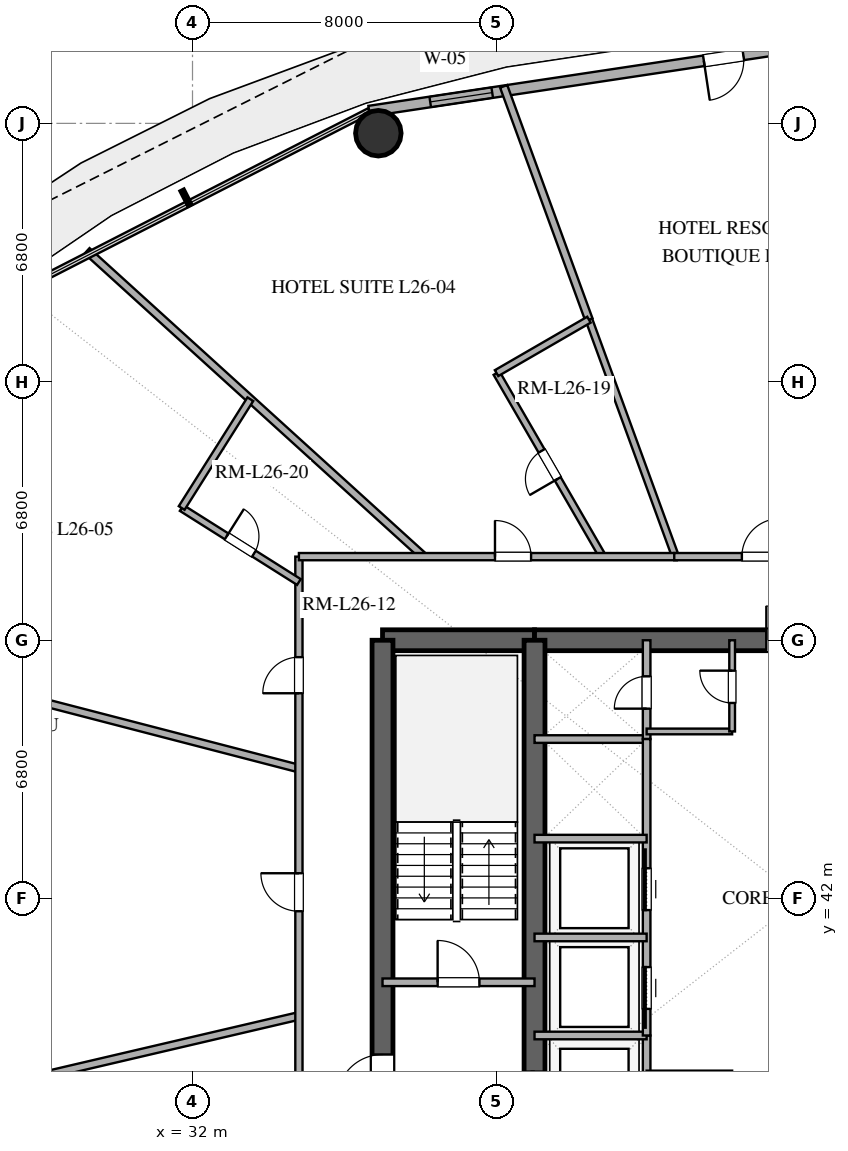
"""IFC4 building model, lengths in metres.
Left out: names, types, materials, properties, quantities, classifications, styles, units other than length and angle.
Written with IfcOpenShell. Run it as: python <this file> out.ifc"""

import sys

from ifc_helpers import new_model, si_unit, direction, frame, frame_2d, origin, origin_2d, place, context, subcontext, project, spatial, rectangle, hollow_circle, extrude, element, fill, save


model = new_model("IFC4")
c1 = context("Model", 3, precision=1e-05, world=origin(), true_north=direction((0.0, 1.0)))
c2 = subcontext(c1, "Body", "Model", "MODEL_VIEW")
j1 = project(units=[si_unit("LENGTHUNIT", "METRE"), si_unit("PLANEANGLEUNIT", "RADIAN")], contexts=[c1])
p1 = place(None, origin())
s1 = spatial("IfcSite", under=j1, at=p1, CompositionType="ELEMENT")
p2 = place(p1, origin())
s2 = spatial("IfcBuilding", under=s1, at=p2, CompositionType="ELEMENT")
p3 = place(p2, frame((0.0, 0.0, 105.6)))
s3 = spatial("IfcBuildingStorey", under=s2, at=p3, CompositionType="ELEMENT", Elevation=105.6)
p4 = place(p3, frame((37.0, 48.8, 0.0), z_axis=(0.0, 0.0, 1.0), x_axis=(1.0, 0.0, 0.0)))
e1 = element("IfcWall", 1, at=p4, inside=s3, PredefinedType="SHEAR", context=c2, shape_type="SweptSolid", body=[
    extrude(rectangle(XDim=4.0, YDim=0.55, at=frame_2d((2.0, 0.0))), origin(), (0.0, 0.0, 1.0), 3.38),
])
p5 = place(p3, frame((41.0, 48.8, 0.0), z_axis=(0.0, 0.0, 1.0), x_axis=(1.0, 0.0, 0.0)))
e2 = element("IfcWall", 2, at=p5, inside=s3, PredefinedType="SHEAR", context=c2, shape_type="SweptSolid", body=[
    extrude(rectangle(XDim=14.0, YDim=0.55, at=frame_2d((7.0, 0.0))), origin(), (0.0, 0.0, 1.0), 3.38),
])
p6 = place(p5, frame((6.1, 0.0, 0.0)))
e3 = element("IfcOpeningElement", 3, at=p6, cuts=e2, PredefinedType="OPENING", context=c2, shape_type="SweptSolid", body=[
    extrude(rectangle(XDim=1.8, YDim=2.25, at=frame_2d((0.9, 1.125))), frame((0.0, 0.285, 0.0), z_axis=(0.0, -1.0, 0.0), x_axis=(1.0, 0.0, 0.0)), (0.0, 0.0, 1.0), 0.57),
])
p7 = place(p3, frame((37.0, 35.2, 0.0), z_axis=(0.0, 0.0, 1.0), x_axis=(0.0, 1.0, 0.0)))
e4 = element("IfcWall", 4, at=p7, inside=s3, PredefinedType="SHEAR", context=c2, shape_type="SweptSolid", body=[
    extrude(rectangle(XDim=13.6, YDim=0.55, at=frame_2d((6.8, 0.0))), origin(), (0.0, 0.0, 1.0), 3.38),
])
p8 = place(p7, frame((1.5, 0.0, 0.0)))
e5 = element("IfcOpeningElement", 5, at=p8, cuts=e4, PredefinedType="OPENING", context=c2, shape_type="SweptSolid", body=[
    extrude(rectangle(XDim=1.2, YDim=2.15, at=frame_2d((0.6, 1.075))), frame((0.0, 0.285, 0.0), z_axis=(0.0, -1.0, 0.0), x_axis=(1.0, 0.0, 0.0)), (0.0, 0.0, 1.0), 0.57),
])
p9 = place(p3, frame((41.0, 35.2, 0.0), z_axis=(0.0, 0.0, 1.0), x_axis=(0.0, 1.0, 0.0)))
e6 = element("IfcWall", 6, at=p9, inside=s3, PredefinedType="SHEAR", context=c2, shape_type="SweptSolid", body=[
    extrude(rectangle(XDim=13.6, YDim=0.55, at=frame_2d((6.8, 0.0))), origin(), (0.0, 0.0, 1.0), 3.38),
])
p10 = place(p9, frame((1.15, 0.0, 0.0)))
e7 = element("IfcOpeningElement", 7, at=p10, cuts=e6, PredefinedType="OPENING", context=c2, shape_type="SweptSolid", body=[
    extrude(rectangle(XDim=1.1, YDim=2.2, at=frame_2d((0.55, 1.1))), frame((0.0, 0.285, 0.0), z_axis=(0.0, -1.0, 0.0), x_axis=(1.0, 0.0, 0.0)), (0.0, 0.0, 1.0), 0.57),
])
p11 = place(p3, frame((36.89, 62.141, 0.0), z_axis=(0.0, 0.0, 1.0), x_axis=(1.0, 0.0, 0.0)))
e8 = element("IfcColumn", 8, at=p11, inside=s3, PredefinedType="COLUMN", context=c2, shape_type="SweptSolid", body=[
    extrude(hollow_circle(Radius=0.6, WallThickness=0.032, at=origin_2d()), origin(), (0.0, 0.0, 1.0), 3.38),
])
p12 = place(p3, frame((48.0, 64.43, 0.0), z_axis=(0.0, 0.0, 1.0), x_axis=(-0.988877774656, -0.148730450117, 0.0)))
e9 = element("IfcWall", 9, at=p12, inside=s3, PredefinedType="SOLIDWALL", context=c2, shape_type="SweptSolid", body=[
    extrude(rectangle(XDim=11.479, YDim=0.28, at=frame_2d((5.74, 0.0))), origin(), (0.0, 0.0, 1.0), 3.38),
])
p13 = place(p12, frame((1.524, 0.0, 0.0)))
e10 = element("IfcOpeningElement", 10, at=p13, cuts=e9, PredefinedType="OPENING", context=c2, shape_type="SweptSolid", body=[
    extrude(rectangle(XDim=1.05, YDim=2.2, at=frame_2d((0.525, 1.1))), frame((0.0, 0.15, 0.0), z_axis=(0.0, -1.0, 0.0), x_axis=(1.0, 0.0, 0.0)), (0.0, 0.0, 1.0), 0.3),
])
p14 = place(p12, frame((8.205, 0.0, 0.85)))
e11 = element("IfcOpeningElement", 11, at=p14, cuts=e9, PredefinedType="OPENING", context=c2, shape_type="SweptSolid", body=[
    extrude(rectangle(XDim=1.65, YDim=2.0, at=frame_2d((0.825, 1.0))), frame((0.0, 0.15, 0.0), z_axis=(0.0, -1.0, 0.0), x_axis=(1.0, 0.0, 0.0)), (0.0, 0.0, 1.0), 0.3),
])
p15 = place(p3, frame((37.0, 39.8, 0.0), z_axis=(0.0, 0.0, 1.0), x_axis=(1.0, 0.0, 0.0)))
e12 = element("IfcWall", 12, at=p15, inside=s3, PredefinedType="SOLIDWALL", context=c2, shape_type="SweptSolid", body=[
    extrude(rectangle(XDim=4.0, YDim=0.2, at=frame_2d((2.0, 0.0))), origin(), (0.0, 0.0, 1.0), 2.74),
])
p16 = place(p15, frame((1.45, 0.0, 0.0)))
e13 = element("IfcOpeningElement", 13, at=p16, cuts=e12, PredefinedType="OPENING", context=c2, shape_type="SweptSolid", body=[
    extrude(rectangle(XDim=1.1, YDim=2.15, at=frame_2d((0.55, 1.075))), frame((0.0, 0.11, 0.0), z_axis=(0.0, -1.0, 0.0), x_axis=(1.0, 0.0, 0.0)), (0.0, 0.0, 1.0), 0.22),
])
p17 = place(p3, frame((43.95, 35.2, 0.0), z_axis=(0.0, 0.0, 1.0), x_axis=(0.0, 1.0, 0.0)))
e14 = element("IfcWall", 14, at=p17, inside=s3, PredefinedType="SOLIDWALL", context=c2, shape_type="SweptSolid", body=[
    extrude(rectangle(XDim=3.2, YDim=0.2, at=frame_2d((1.6, 0.0))), origin(), (0.0, 0.0, 1.0), 2.74),
])
for number, where, z_axis, x_axis in (
    (15, (41.0, 38.4, 0.0), (0.0, 0.0, 1.0), (1.0, 0.0, 0.0)),
    (16, (41.0, 46.2, 0.0), (0.0, 0.0, 1.0), (1.0, 0.0, 0.0)),
):
    element("IfcWall", number, at=place(p3, frame(where, z_axis=z_axis, x_axis=x_axis)), inside=s3, PredefinedType="SOLIDWALL", context=c2, shape_type="SweptSolid", body=[
        extrude(rectangle(XDim=2.95, YDim=0.2, at=frame_2d((1.475, 0.0))), origin(), (0.0, 0.0, 1.0), 2.74),
    ])
p18 = place(p3, frame((43.95, 46.2, 0.0), z_axis=(0.0, 0.0, 1.0), x_axis=(0.0, 1.0, 0.0)))
e17 = element("IfcWall", 17, at=p18, inside=s3, PredefinedType="SOLIDWALL", context=c2, shape_type="SweptSolid", body=[
    extrude(rectangle(XDim=2.6, YDim=0.2, at=frame_2d((1.3, 0.0))), origin(), (0.0, 0.0, 1.0), 2.74),
])
p19 = place(p18, frame((0.8, 0.0, 0.0)))
e18 = element("IfcOpeningElement", 18, at=p19, cuts=e17, PredefinedType="OPENING", context=c2, shape_type="SweptSolid", body=[
    extrude(rectangle(XDim=0.85, YDim=2.15, at=frame_2d((0.425, 1.075))), frame((0.0, 0.11, 0.0), z_axis=(0.0, -1.0, 0.0), x_axis=(1.0, 0.0, 0.0)), (0.0, 0.0, 1.0), 0.22),
])
p20 = place(p3, frame((43.95, 38.4, 0.0), z_axis=(0.0, 0.0, 1.0), x_axis=(0.0, 1.0, 0.0)))
e19 = element("IfcWall", 19, at=p20, inside=s3, PredefinedType="SOLIDWALL", context=c2, shape_type="SweptSolid", body=[
    extrude(rectangle(XDim=7.8, YDim=0.2, at=frame_2d((3.9, 0.0))), origin(), (0.0, 0.0, 1.0), 2.74),
])
p21 = place(p20, frame((0.7, 0.0, 0.0)))
e20 = element("IfcOpeningElement", 20, at=p21, cuts=e19, PredefinedType="OPENING", context=c2, shape_type="SweptSolid", body=[
    extrude(rectangle(XDim=1.1, YDim=2.2, at=frame_2d((0.55, 1.1))), frame((0.0, 0.11, 0.0), z_axis=(0.0, -1.0, 0.0), x_axis=(1.0, 0.0, 0.0)), (0.0, 0.0, 1.0), 0.22),
])
p22 = place(p20, frame((3.3, 0.0, 0.0)))
e21 = element("IfcOpeningElement", 21, at=p22, cuts=e19, PredefinedType="OPENING", context=c2, shape_type="SweptSolid", body=[
    extrude(rectangle(XDim=1.1, YDim=2.2, at=frame_2d((0.55, 1.1))), frame((0.0, 0.11, 0.0), z_axis=(0.0, -1.0, 0.0), x_axis=(1.0, 0.0, 0.0)), (0.0, 0.0, 1.0), 0.22),
])
for number, where, z_axis, x_axis in (
    (22, (41.0, 40.98, 0.0), (0.0, 0.0, 1.0), (1.0, 0.0, 0.0)),
    (23, (41.0, 43.58, 0.0), (0.0, 0.0, 1.0), (1.0, 0.0, 0.0)),
):
    element("IfcWall", number, at=place(p3, frame(where, z_axis=z_axis, x_axis=x_axis)), inside=s3, PredefinedType="SOLIDWALL", context=c2, shape_type="SweptSolid", body=[
        extrude(rectangle(XDim=2.95, YDim=0.2, at=frame_2d((1.475, 0.0))), origin(), (0.0, 0.0, 1.0), 2.74),
    ])
for number, where, z_axis, x_axis in (
    (24, (43.95, 37.4, 0.0), (0.0, 0.0, 1.0), (1.0, 0.0, 0.0)),
    (25, (43.95, 46.4, 0.0), (0.0, 0.0, 1.0), (1.0, 0.0, 0.0)),
):
    element("IfcWall", number, at=place(p3, frame(where, z_axis=z_axis, x_axis=x_axis)), inside=s3, PredefinedType="PARTITIONING", context=c2, shape_type="SweptSolid", body=[
        extrude(rectangle(XDim=2.25, YDim=0.15, at=frame_2d((1.125, 0.0))), origin(), (0.0, 0.0, 1.0), 2.74),
    ])
p23 = place(p3, frame((46.2, 46.4, 0.0), z_axis=(0.0, 0.0, 1.0), x_axis=(0.0, 1.0, 0.0)))
e26 = element("IfcWall", 26, at=p23, inside=s3, PredefinedType="PARTITIONING", context=c2, shape_type="SweptSolid", body=[
    extrude(rectangle(XDim=2.4, YDim=0.15, at=frame_2d((1.2, 0.0))), origin(), (0.0, 0.0, 1.0), 2.74),
])
p24 = place(p23, frame((0.75, 0.0, 0.0)))
e27 = element("IfcOpeningElement", 27, at=p24, cuts=e26, PredefinedType="OPENING", context=c2, shape_type="SweptSolid", body=[
    extrude(rectangle(XDim=0.85, YDim=2.15, at=frame_2d((0.425, 1.075))), frame((0.0, 0.085, 0.0), z_axis=(0.0, -1.0, 0.0), x_axis=(1.0, 0.0, 0.0)), (0.0, 0.0, 1.0), 0.17),
])
p25 = place(p3, frame((34.8, 45.423, 0.0), z_axis=(0.0, 0.0, 1.0), x_axis=(-0.967976280286, 0.251041671447, 0.0)))
e28 = element("IfcWall", 28, at=p25, inside=s3, PredefinedType="PARTITIONING", context=c2, shape_type="SweptSolid", body=[
    extrude(rectangle(XDim=14.598, YDim=0.2, at=frame_2d((7.299, 0.0))), origin(), (0.0, 0.0, 1.0), 2.74),
])
p26 = place(p3, frame((34.8, 38.915, 0.0), z_axis=(0.0, 0.0, 1.0), x_axis=(-0.973762218061, -0.227567885864, 0.0)))
e29 = element("IfcWall", 29, at=p26, inside=s3, PredefinedType="PARTITIONING", context=c2, shape_type="SweptSolid", body=[
    extrude(rectangle(XDim=14.67, YDim=0.2, at=frame_2d((7.335, 0.0))), origin(), (0.0, 0.0, 1.0), 2.74),
])
p27 = place(p3, frame((42.432, 57.234, 0.0), z_axis=(0.0, 0.0, 1.0), x_axis=(0.343307767445, -0.939222964376, 0.0)))
e30 = element("IfcWall", 30, at=p27, inside=s3, PredefinedType="PLUMBINGWALL", context=c2, shape_type="SweptSolid", body=[
    extrude(rectangle(XDim=6.638, YDim=0.18, at=frame_2d((3.319, 0.0))), origin(), (0.0, 0.0, 1.0), 2.74),
])
p28 = place(p3, frame((34.8, 36.329, 0.0), z_axis=(0.0, 0.0, 1.0), x_axis=(0.0, 1.0, 0.0)))
e31 = element("IfcWall", 31, at=p28, inside=s3, PredefinedType="PARTITIONING", context=c2, shape_type="SweptSolid", body=[
    extrude(rectangle(XDim=14.671, YDim=0.19, at=frame_2d((7.336, 0.0))), origin(), (0.0, 0.0, 1.0), 2.74),
])
p29 = place(p28, frame((5.341, 0.0, 0.0)))
e32 = element("IfcOpeningElement", 32, at=p29, cuts=e31, PredefinedType="OPENING", context=c2, shape_type="SweptSolid", body=[
    extrude(rectangle(XDim=1.0, YDim=2.2, at=frame_2d((0.5, 1.1))), frame((0.0, 0.105, 0.0), z_axis=(0.0, -1.0, 0.0), x_axis=(1.0, 0.0, 0.0)), (0.0, 0.0, 1.0), 0.21),
])
p30 = place(p28, frame((11.076, 0.0, 0.0)))
e33 = element("IfcOpeningElement", 33, at=p30, cuts=e31, PredefinedType="OPENING", context=c2, shape_type="SweptSolid", body=[
    extrude(rectangle(XDim=0.95, YDim=2.15, at=frame_2d((0.475, 1.075))), frame((0.0, 0.105, 0.0), z_axis=(0.0, -1.0, 0.0), x_axis=(1.0, 0.0, 0.0)), (0.0, 0.0, 1.0), 0.21),
])
p31 = place(p3, frame((40.188, 63.374, 0.0), z_axis=(0.0, 0.0, 1.0), x_axis=(0.343281030887, -0.939232736777, 0.0)))
e34 = element("IfcWall", 34, at=p31, inside=s3, PredefinedType="PARTITIONING", context=c2, shape_type="SweptSolid", body=[
    extrude(rectangle(XDim=6.537, YDim=0.2, at=frame_2d((3.268, 0.0))), origin(), (0.0, 0.0, 1.0), 2.74),
])
p32 = place(p3, frame((38.085, 51.0, 0.0), z_axis=(0.0, 0.0, 1.0), x_axis=(-0.74043922717, 0.672123315224, 0.0)))
e35 = element("IfcWall", 35, at=p32, inside=s3, PredefinedType="PARTITIONING", context=c2, shape_type="SweptSolid", body=[
    extrude(rectangle(XDim=11.968, YDim=0.2, at=frame_2d((5.984, 0.0))), origin(), (0.0, 0.0, 1.0), 2.74),
])
p33 = place(p3, frame((42.794, 51.0, 0.0), z_axis=(0.0, 0.0, 1.0), x_axis=(-0.500713600684, 0.865613014049, 0.0)))
e36 = element("IfcWall", 36, at=p33, inside=s3, PredefinedType="PLUMBINGWALL", context=c2, shape_type="SweptSolid", body=[
    extrude(rectangle(XDim=5.578, YDim=0.18, at=frame_2d((2.789, 0.0))), origin(), (0.0, 0.0, 1.0), 2.74),
])
p34 = place(p33, frame((2.364, 0.0, 0.0)))
e37 = element("IfcOpeningElement", 37, at=p34, cuts=e36, PredefinedType="OPENING", context=c2, shape_type="SweptSolid", body=[
    extrude(rectangle(XDim=0.85, YDim=2.1, at=frame_2d((0.425, 1.05))), frame((0.0, 0.1, 0.0), z_axis=(0.0, -1.0, 0.0), x_axis=(1.0, 0.0, 0.0)), (0.0, 0.0, 1.0), 0.2),
])
p35 = place(p3, frame((34.8, 51.0, 0.0), z_axis=(0.0, 0.0, 1.0), x_axis=(1.0, 0.0, 0.0)))
e38 = element("IfcWall", 38, at=p35, inside=s3, PredefinedType="PARTITIONING", context=c2, shape_type="SweptSolid", body=[
    extrude(rectangle(XDim=9.945, YDim=0.19, at=frame_2d((4.972, 0.0))), origin(), (0.0, 0.0, 1.0), 2.74),
])
p36 = place(p35, frame((5.159, 0.0, 0.0)))
e39 = element("IfcOpeningElement", 39, at=p36, cuts=e38, PredefinedType="OPENING", context=c2, shape_type="SweptSolid", body=[
    extrude(rectangle(XDim=0.95, YDim=2.15, at=frame_2d((0.475, 1.075))), frame((0.0, 0.105, 0.0), z_axis=(0.0, -1.0, 0.0), x_axis=(1.0, 0.0, 0.0)), (0.0, 0.0, 1.0), 0.21),
])
p37 = place(p3, frame((44.677, 51.0, 0.0), z_axis=(0.0, 0.0, 1.0), x_axis=(1.0, 0.0, 0.0)))
e40 = element("IfcWall", 40, at=p37, inside=s3, PredefinedType="PARTITIONING", context=c2, shape_type="SweptSolid", body=[
    extrude(rectangle(XDim=7.621, YDim=0.19, at=frame_2d((3.81, 0.0))), origin(), (0.0, 0.0, 1.0), 2.74),
])
p38 = place(p37, frame((1.78, 0.0, 0.0)))
e41 = element("IfcOpeningElement", 41, at=p38, cuts=e40, PredefinedType="OPENING", context=c2, shape_type="SweptSolid", body=[
    extrude(rectangle(XDim=1.0, YDim=2.2, at=frame_2d((0.5, 1.1))), frame((0.0, 0.105, 0.0), z_axis=(0.0, -1.0, 0.0), x_axis=(1.0, 0.0, 0.0)), (0.0, 0.0, 1.0), 0.21),
])
p39 = place(p37, frame((5.583, 0.0, 0.0)))
e42 = element("IfcOpeningElement", 42, at=p39, cuts=e40, PredefinedType="OPENING", context=c2, shape_type="SweptSolid", body=[
    extrude(rectangle(XDim=0.95, YDim=2.15, at=frame_2d((0.475, 1.075))), frame((0.0, 0.105, 0.0), z_axis=(0.0, -1.0, 0.0), x_axis=(1.0, 0.0, 0.0)), (0.0, 0.0, 1.0), 0.21),
])
p40 = place(p3, frame((31.715, 52.28, 0.0), z_axis=(0.0, 0.0, 1.0), x_axis=(0.845617675202, -0.533789047645, 0.0)))
e43 = element("IfcWall", 43, at=p40, inside=s3, PredefinedType="PLUMBINGWALL", context=c2, shape_type="SweptSolid", body=[
    extrude(rectangle(XDim=3.648, YDim=0.18, at=frame_2d((1.824, 0.0))), origin(), (0.0, 0.0, 1.0), 2.74),
])
p41 = place(p40, frame((1.399, 0.0, 0.0)))
e44 = element("IfcOpeningElement", 44, at=p41, cuts=e43, PredefinedType="OPENING", context=c2, shape_type="SweptSolid", body=[
    extrude(rectangle(XDim=0.85, YDim=2.1, at=frame_2d((0.425, 1.05))), frame((0.0, 0.1, 0.0), z_axis=(0.0, -1.0, 0.0), x_axis=(1.0, 0.0, 0.0)), (0.0, 0.0, 1.0), 0.2),
])
p42 = place(p3, frame((33.522, 55.142, 0.0), z_axis=(0.0, 0.0, 1.0), x_axis=(-0.533805735916, -0.845607140641, 0.0)))
e45 = element("IfcWall", 45, at=p42, inside=s3, PredefinedType="PLUMBINGWALL", context=c2, shape_type="SweptSolid", body=[
    extrude(rectangle(XDim=3.385, YDim=0.18, at=frame_2d((1.692, 0.0))), origin(), (0.0, 0.0, 1.0), 2.74),
])
p43 = place(p3, frame((40.001, 55.828, 0.0), z_axis=(0.0, 0.0, 1.0), x_axis=(0.865614723212, 0.50071064594, 0.0)))
e46 = element("IfcWall", 46, at=p43, inside=s3, PredefinedType="PLUMBINGWALL", context=c2, shape_type="SweptSolid", body=[
    extrude(rectangle(XDim=2.808, YDim=0.18, at=frame_2d((1.404, 0.0))), origin(), (0.0, 0.0, 1.0), 2.74),
])
p44 = place(p13, origin())
e47 = element("IfcDoor", 47, at=p44, inside=s3, OperationType="SINGLE_SWING_RIGHT", PredefinedType="DOOR", context=c2, shape_type="SweptSolid", body=[
    extrude(rectangle(XDim=1.05, YDim=2.2, at=frame_2d((0.525, 1.1))), frame((0.0, 0.025, 0.0), z_axis=(0.0, -1.0, 0.0), x_axis=(1.0, 0.0, 0.0)), (0.0, 0.0, 1.0), 0.05),
])
fill(e10, e47)
p45 = place(p14, origin())
e48 = element("IfcWindow", 48, at=p45, inside=s3, PartitioningType="SINGLE_PANEL", PredefinedType="WINDOW", context=c2, shape_type="SweptSolid", body=[
    extrude(rectangle(XDim=1.65, YDim=2.0, at=frame_2d((0.825, 1.0))), frame((0.0, 0.03, 0.0), z_axis=(0.0, -1.0, 0.0), x_axis=(1.0, 0.0, 0.0)), (0.0, 0.0, 1.0), 0.06),
])
fill(e11, e48)
p46 = place(p8, origin())
e49 = element("IfcDoor", 49, at=p46, inside=s3, OperationType="SINGLE_SWING_LEFT", PredefinedType="DOOR", context=c2, shape_type="SweptSolid", body=[
    extrude(rectangle(XDim=1.2, YDim=2.15, at=frame_2d((0.6, 1.075))), frame((0.0, 0.025, 0.0), z_axis=(0.0, -1.0, 0.0), x_axis=(1.0, 0.0, 0.0)), (0.0, 0.0, 1.0), 0.05),
])
fill(e5, e49)
p47 = place(p6, origin())
e50 = element("IfcDoor", 50, at=p47, inside=s3, OperationType="DOUBLE_DOOR_SINGLE_SWING", PredefinedType="DOOR", context=c2, shape_type="SweptSolid", body=[
    extrude(rectangle(XDim=1.8, YDim=2.25, at=frame_2d((0.9, 1.125))), frame((0.0, 0.025, 0.0), z_axis=(0.0, -1.0, 0.0), x_axis=(1.0, 0.0, 0.0)), (0.0, 0.0, 1.0), 0.05),
])
fill(e3, e50)
p48 = place(p16, origin())
e51 = element("IfcDoor", 51, at=p48, inside=s3, OperationType="SINGLE_SWING_LEFT", PredefinedType="DOOR", context=c2, shape_type="SweptSolid", body=[
    extrude(rectangle(XDim=1.1, YDim=2.15, at=frame_2d((0.55, 1.075))), frame((0.0, 0.025, 0.0), z_axis=(0.0, -1.0, 0.0), x_axis=(1.0, 0.0, 0.0)), (0.0, 0.0, 1.0), 0.05),
])
fill(e13, e51)
p49 = place(p19, origin())
e52 = element("IfcDoor", 52, at=p49, inside=s3, OperationType="SINGLE_SWING_LEFT", PredefinedType="DOOR", context=c2, shape_type="SweptSolid", body=[
    extrude(rectangle(XDim=0.85, YDim=2.15, at=frame_2d((0.425, 1.075))), frame((0.0, 0.025, 0.0), z_axis=(0.0, -1.0, 0.0), x_axis=(1.0, 0.0, 0.0)), (0.0, 0.0, 1.0), 0.05),
])
fill(e18, e52)
p50 = place(p21, origin())
e53 = element("IfcDoor", 53, at=p50, inside=s3, OperationType="SLIDING_TO_LEFT", PredefinedType="DOOR", context=c2, shape_type="SweptSolid", body=[
    extrude(rectangle(XDim=1.1, YDim=2.2, at=frame_2d((0.55, 1.1))), frame((0.0, 0.025, 0.0), z_axis=(0.0, -1.0, 0.0), x_axis=(1.0, 0.0, 0.0)), (0.0, 0.0, 1.0), 0.05),
])
fill(e20, e53)
p51 = place(p22, origin())
e54 = element("IfcDoor", 54, at=p51, inside=s3, OperationType="SLIDING_TO_RIGHT", PredefinedType="DOOR", context=c2, shape_type="SweptSolid", body=[
    extrude(rectangle(XDim=1.1, YDim=2.2, at=frame_2d((0.55, 1.1))), frame((0.0, 0.025, 0.0), z_axis=(0.0, -1.0, 0.0), x_axis=(1.0, 0.0, 0.0)), (0.0, 0.0, 1.0), 0.05),
])
fill(e21, e54)
p52 = place(p24, origin())
e55 = element("IfcDoor", 55, at=p52, inside=s3, OperationType="SINGLE_SWING_RIGHT", PredefinedType="DOOR", context=c2, shape_type="SweptSolid", body=[
    extrude(rectangle(XDim=0.85, YDim=2.15, at=frame_2d((0.425, 1.075))), frame((0.0, 0.025, 0.0), z_axis=(0.0, -1.0, 0.0), x_axis=(1.0, 0.0, 0.0)), (0.0, 0.0, 1.0), 0.05),
])
fill(e27, e55)
p53 = place(p29, origin())
e56 = element("IfcDoor", 56, at=p53, inside=s3, OperationType="SINGLE_SWING_RIGHT", PredefinedType="DOOR", context=c2, shape_type="SweptSolid", body=[
    extrude(rectangle(XDim=1.0, YDim=2.2, at=frame_2d((0.5, 1.1))), frame((0.0, 0.025, 0.0), z_axis=(0.0, -1.0, 0.0), x_axis=(1.0, 0.0, 0.0)), (0.0, 0.0, 1.0), 0.05),
])
fill(e32, e56)
p54 = place(p30, origin())
e57 = element("IfcDoor", 57, at=p54, inside=s3, OperationType="SINGLE_SWING_LEFT", PredefinedType="DOOR", context=c2, shape_type="SweptSolid", body=[
    extrude(rectangle(XDim=0.95, YDim=2.15, at=frame_2d((0.475, 1.075))), frame((0.0, 0.025, 0.0), z_axis=(0.0, -1.0, 0.0), x_axis=(1.0, 0.0, 0.0)), (0.0, 0.0, 1.0), 0.05),
])
fill(e33, e57)
p55 = place(p34, origin())
e58 = element("IfcDoor", 58, at=p55, inside=s3, OperationType="SINGLE_SWING_LEFT", PredefinedType="DOOR", context=c2, shape_type="SweptSolid", body=[
    extrude(rectangle(XDim=0.85, YDim=2.1, at=frame_2d((0.425, 1.05))), frame((0.0, 0.025, 0.0), z_axis=(0.0, -1.0, 0.0), x_axis=(1.0, 0.0, 0.0)), (0.0, 0.0, 1.0), 0.05),
])
fill(e37, e58)
p56 = place(p36, origin())
e59 = element("IfcDoor", 59, at=p56, inside=s3, OperationType="SINGLE_SWING_LEFT", PredefinedType="DOOR", context=c2, shape_type="SweptSolid", body=[
    extrude(rectangle(XDim=0.95, YDim=2.15, at=frame_2d((0.475, 1.075))), frame((0.0, 0.025, 0.0), z_axis=(0.0, -1.0, 0.0), x_axis=(1.0, 0.0, 0.0)), (0.0, 0.0, 1.0), 0.05),
])
fill(e39, e59)
p57 = place(p38, origin())
e60 = element("IfcDoor", 60, at=p57, inside=s3, OperationType="SINGLE_SWING_RIGHT", PredefinedType="DOOR", context=c2, shape_type="SweptSolid", body=[
    extrude(rectangle(XDim=1.0, YDim=2.2, at=frame_2d((0.5, 1.1))), frame((0.0, 0.025, 0.0), z_axis=(0.0, -1.0, 0.0), x_axis=(1.0, 0.0, 0.0)), (0.0, 0.0, 1.0), 0.05),
])
fill(e41, e60)
p58 = place(p41, origin())
e61 = element("IfcDoor", 61, at=p58, inside=s3, OperationType="SINGLE_SWING_LEFT", PredefinedType="DOOR", context=c2, shape_type="SweptSolid", body=[
    extrude(rectangle(XDim=0.85, YDim=2.1, at=frame_2d((0.425, 1.05))), frame((0.0, 0.025, 0.0), z_axis=(0.0, -1.0, 0.0), x_axis=(1.0, 0.0, 0.0)), (0.0, 0.0, 1.0), 0.05),
])
fill(e44, e61)
save(model, sys.argv[1])
